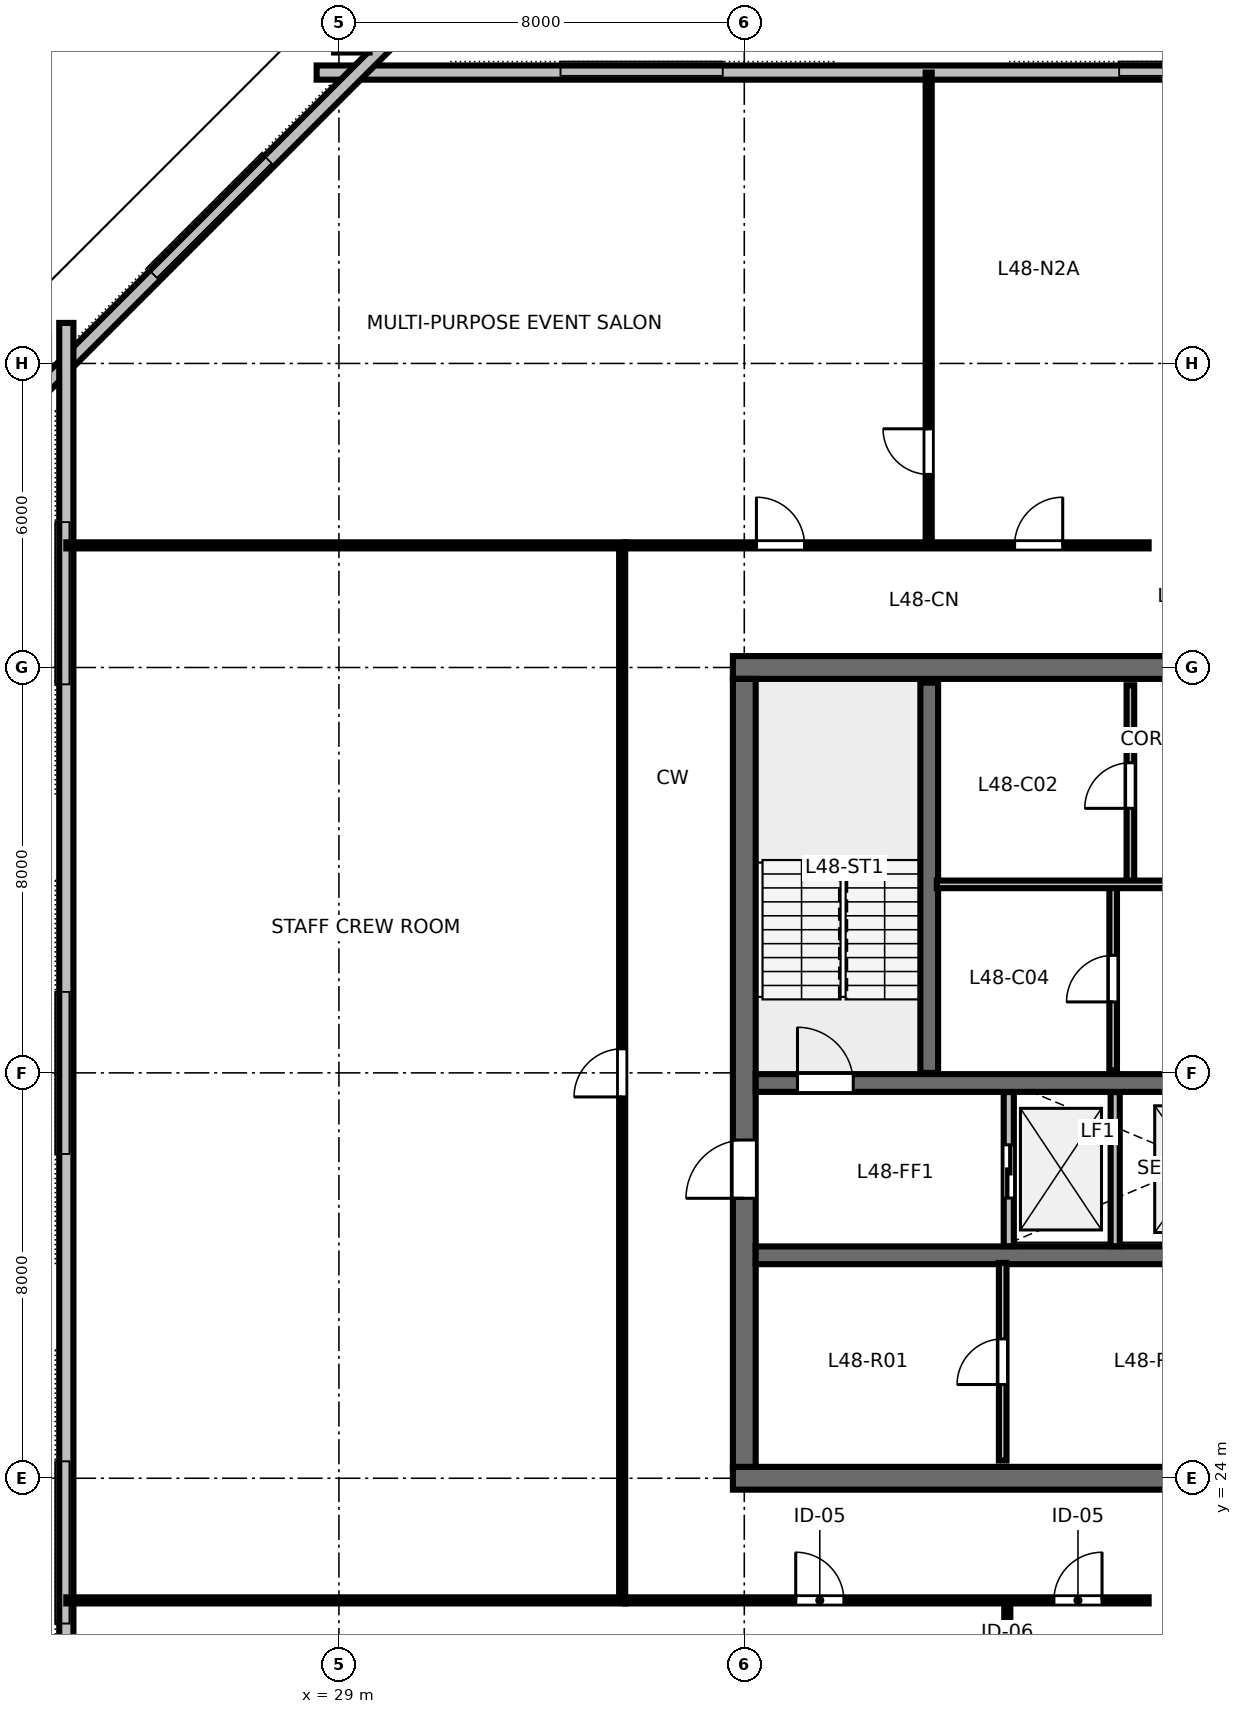
"""IFC4 building model, lengths in metres.
Left out: names, types, materials, properties, quantities, classifications, styles, units other than length and angle.
Written with IfcOpenShell. Run it as: python <this file> out.ifc"""

import sys

from ifc_helpers import new_model, si_unit, direction, frame, frame_2d, origin, origin_2d, place, context, subcontext, project, spatial, rectangle, hollow_rectangle, i_section, extrude, element, fill, save


model = new_model("IFC4")
c1 = context("Model", 3, precision=1e-05, world=origin(), true_north=direction((0.0, 1.0)))
c2 = subcontext(c1, "Body", "Model", "MODEL_VIEW")
j1 = project(units=[si_unit("LENGTHUNIT", "METRE"), si_unit("PLANEANGLEUNIT", "RADIAN")], contexts=[c1])
p1 = place(None, origin())
s1 = spatial("IfcSite", under=j1, at=p1, CompositionType="ELEMENT")
p2 = place(p1, origin())
s2 = spatial("IfcBuilding", under=s1, at=p2, CompositionType="ELEMENT")
p3 = place(p2, frame((0.0, 0.0, 184.2)))
s3 = spatial("IfcBuildingStorey", under=s2, at=p3, CompositionType="ELEMENT", Elevation=184.2)
p4 = place(p3, frame((36.775, 24.0, 0.0), z_axis=(0.0, 0.0, 1.0), x_axis=(1.0, 0.0, 0.0)))
e1 = element("IfcWall", 1, at=p4, inside=s3, PredefinedType="SHEAR", context=c2, shape_type="SweptSolid", body=[
    extrude(rectangle(XDim=18.45, YDim=0.45, at=frame_2d((9.225, 0.0))), origin(), (0.0, 0.0, 1.0), 3.36),
])
p5 = place(p4, frame((13.425, 0.0, 0.0)))
e2 = element("IfcOpeningElement", 2, at=p5, cuts=e1, PredefinedType="OPENING", context=c2, shape_type="SweptSolid", body=[
    extrude(rectangle(XDim=1.6, YDim=2.15, at=frame_2d((0.8, 1.075))), frame((0.0, 0.235, 0.0), z_axis=(0.0, -1.0, 0.0), x_axis=(1.0, 0.0, 0.0)), (0.0, 0.0, 1.0), 0.47),
])
p6 = place(p3, frame((36.775, 40.0, 0.0), z_axis=(0.0, 0.0, 1.0), x_axis=(1.0, 0.0, 0.0)))
e3 = element("IfcWall", 3, at=p6, inside=s3, PredefinedType="SHEAR", context=c2, shape_type="SweptSolid", body=[
    extrude(rectangle(XDim=18.45, YDim=0.45, at=frame_2d((9.225, 0.0))), origin(), (0.0, 0.0, 1.0), 3.36),
])
p7 = place(p6, frame((8.725, 0.0, 0.0)))
e4 = element("IfcOpeningElement", 4, at=p7, cuts=e3, PredefinedType="OPENING", context=c2, shape_type="SweptSolid", body=[
    extrude(rectangle(XDim=1.0, YDim=2.15, at=frame_2d((0.5, 1.075))), frame((0.0, 0.235, 0.0), z_axis=(0.0, -1.0, 0.0), x_axis=(1.0, 0.0, 0.0)), (0.0, 0.0, 1.0), 0.47),
])
p8 = place(p3, frame((37.0, 24.225, 0.0), z_axis=(0.0, 0.0, 1.0), x_axis=(0.0, 1.0, 0.0)))
e5 = element("IfcWall", 5, at=p8, inside=s3, PredefinedType="SHEAR", context=c2, shape_type="SweptSolid", body=[
    extrude(rectangle(XDim=15.55, YDim=0.45, at=frame_2d((7.775, 0.0))), origin(), (0.0, 0.0, 1.0), 3.36),
])
p9 = place(p8, frame((5.3, 0.0, 0.0)))
e6 = element("IfcOpeningElement", 6, at=p9, cuts=e5, PredefinedType="OPENING", context=c2, shape_type="SweptSolid", body=[
    extrude(rectangle(XDim=1.15, YDim=2.15, at=frame_2d((0.575, 1.075))), frame((0.0, 0.235, 0.0), z_axis=(0.0, -1.0, 0.0), x_axis=(1.0, 0.0, 0.0)), (0.0, 0.0, 1.0), 0.47),
])
p10 = place(p3, frame((37.225, 31.8, 0.0), z_axis=(0.0, 0.0, 1.0), x_axis=(1.0, 0.0, 0.0)))
e7 = element("IfcWall", 7, at=p10, inside=s3, PredefinedType="SHEAR", context=c2, shape_type="SweptSolid", body=[
    extrude(rectangle(XDim=17.55, YDim=0.35, at=frame_2d((8.775, 0.0))), origin(), (0.0, 0.0, 1.0), 3.36),
])
p11 = place(p10, frame((0.825, 0.0, 0.0)))
e8 = element("IfcOpeningElement", 8, at=p11, cuts=e7, PredefinedType="OPENING", context=c2, shape_type="SweptSolid", body=[
    extrude(rectangle(XDim=1.1, YDim=2.15, at=frame_2d((0.55, 1.075))), frame((0.0, 0.185, 0.0), z_axis=(0.0, -1.0, 0.0), x_axis=(1.0, 0.0, 0.0)), (0.0, 0.0, 1.0), 0.37),
])
p12 = place(p10, frame((14.725, 0.0, 0.0)))
e9 = element("IfcOpeningElement", 9, at=p12, cuts=e7, PredefinedType="OPENING", context=c2, shape_type="SweptSolid", body=[
    extrude(rectangle(XDim=1.1, YDim=2.15, at=frame_2d((0.55, 1.075))), frame((0.0, 0.185, 0.0), z_axis=(0.0, -1.0, 0.0), x_axis=(1.0, 0.0, 0.0)), (0.0, 0.0, 1.0), 0.37),
])
p13 = place(p3, frame((37.225, 28.4, 0.0), z_axis=(0.0, 0.0, 1.0), x_axis=(1.0, 0.0, 0.0)))
e10 = element("IfcWall", 10, at=p13, inside=s3, PredefinedType="SHEAR", context=c2, shape_type="SweptSolid", body=[
    extrude(rectangle(XDim=17.55, YDim=0.35, at=frame_2d((8.775, 0.0))), origin(), (0.0, 0.0, 1.0), 3.36),
])
p14 = place(p3, frame((29.255, 52.562, 0.0), z_axis=(0.252686968591, -0.187893668889, 0.949128687321), x_axis=(0.596699148139, 0.802465031394, 0.0)))
e11 = element("IfcColumn", 11, at=p14, inside=s3, PredefinedType="COLUMN", context=c2, shape_type="SweptSolid", body=[
    extrude(hollow_rectangle(XDim=0.7, YDim=0.85, WallThickness=0.04, at=origin_2d()), origin(), (0.0, 0.0, 1.0), 3.538),
])
p15 = place(p3, frame((22.854, 46.184, 0.0), z_axis=(0.221678120535, -0.219053075792, 0.950197116846), x_axis=(-0.67588069394, 0.66787712075, 0.311649545384)))
e12 = element("IfcColumn", 12, at=p15, inside=s3, PredefinedType="COLUMN", context=c2, shape_type="SweptSolid", body=[
    extrude(hollow_rectangle(XDim=0.7, YDim=0.85, WallThickness=0.04, at=origin_2d()), origin(), (0.0, 0.0, 1.0), 3.534),
])
p16 = place(p3, frame((22.96, 32.0, 0.0), z_axis=(0.226255694856, 0.0, 0.974067944522), x_axis=(-0.974067944522, 0.0, 0.226255694856)))
e13 = element("IfcColumn", 13, at=p16, inside=s3, PredefinedType="COLUMN", context=c2, shape_type="SweptSolid", body=[
    extrude(i_section(OverallWidth=0.406, OverallDepth=0.425, WebThickness=0.033, FlangeThickness=0.052, FilletRadius=0.025, at=origin_2d()), origin(), (0.0, 0.0, 1.0), 3.448),
])
p17 = place(p3, frame((63.44, 51.74, 0.0), z_axis=(0.0, 0.0, 1.0), x_axis=(-1.0, 0.0, 0.0)))
e14 = element("IfcWall", 14, at=p17, inside=s3, PredefinedType="STANDARD", context=c2, shape_type="SweptSolid", body=[
    extrude(rectangle(XDim=34.88, YDim=0.28, at=frame_2d((17.44, 0.0))), origin(), (0.0, 0.0, 1.0), 2.817),
])
p18 = place(p3, frame((29.946, 52.314, 0.0), z_axis=(0.0, 0.0, 1.0), x_axis=(-0.707106781187, -0.707106781187, 0.0)))
e15 = element("IfcWall", 15, at=p18, inside=s3, PredefinedType="STANDARD", context=c2, shape_type="SweptSolid", body=[
    extrude(rectangle(XDim=9.757, YDim=0.28, at=frame_2d((4.879, 0.0))), origin(), (0.0, 0.0, 1.0), 3.36),
])
p19 = place(p3, frame((23.62, 46.8, 0.0), z_axis=(0.0, 0.0, 1.0), x_axis=(0.0, -1.0, 0.0)))
e16 = element("IfcWall", 16, at=p19, inside=s3, PredefinedType="STANDARD", context=c2, shape_type="SweptSolid", body=[
    extrude(rectangle(XDim=29.6, YDim=0.28, at=frame_2d((14.8, 0.0))), origin(), (0.0, 0.0, 1.0), 2.817),
])
p20 = place(p3, frame((40.65, 32.0, 0.0), z_axis=(0.0, 0.0, 1.0), x_axis=(0.0, 1.0, 0.0)))
e17 = element("IfcWall", 17, at=p20, inside=s3, PredefinedType="SHEAR", context=c2, shape_type="SweptSolid", body=[
    extrude(rectangle(XDim=7.7, YDim=0.35, at=frame_2d((3.85, 0.0))), origin(), (0.0, 0.0, 1.0), 3.6),
])
p21 = place(p3, frame((44.62, 35.72, 0.0), z_axis=(0.0, 0.0, 1.0), x_axis=(0.0, 1.0, 0.0)))
e18 = element("IfcWall", 18, at=p21, inside=s3, PredefinedType="PARTITIONING", context=c2, shape_type="SweptSolid", body=[
    extrude(rectangle(XDim=3.93, YDim=0.15, at=frame_2d((1.965, 0.0))), origin(), (0.0, 0.0, 1.0), 3.36),
])
p22 = place(p21, frame((1.5, 0.0, 0.0)))
e19 = element("IfcOpeningElement", 19, at=p22, cuts=e18, PredefinedType="OPENING", context=c2, shape_type="SweptSolid", body=[
    extrude(rectangle(XDim=0.9, YDim=2.15, at=frame_2d((0.45, 1.075))), frame((0.0, 0.085, 0.0), z_axis=(0.0, -1.0, 0.0), x_axis=(1.0, 0.0, 0.0)), (0.0, 0.0, 1.0), 0.17),
])
p23 = place(p3, frame((44.28, 32.05, 0.0), z_axis=(0.0, 0.0, 1.0), x_axis=(0.0, 1.0, 0.0)))
e20 = element("IfcWall", 20, at=p23, inside=s3, PredefinedType="PARTITIONING", context=c2, shape_type="SweptSolid", body=[
    extrude(rectangle(XDim=3.67, YDim=0.15, at=frame_2d((1.835, 0.0))), origin(), (0.0, 0.0, 1.0), 3.36),
])
p24 = place(p23, frame((1.35, 0.0, 0.0)))
e21 = element("IfcOpeningElement", 21, at=p24, cuts=e20, PredefinedType="OPENING", context=c2, shape_type="SweptSolid", body=[
    extrude(rectangle(XDim=0.92, YDim=2.15, at=frame_2d((0.46, 1.075))), frame((0.0, 0.085, 0.0), z_axis=(0.0, -1.0, 0.0), x_axis=(1.0, 0.0, 0.0)), (0.0, 0.0, 1.0), 0.17),
])
p25 = place(p3, frame((40.8, 35.72, 0.0), z_axis=(0.0, 0.0, 1.0), x_axis=(1.0, 0.0, 0.0)))
e22 = element("IfcWall", 22, at=p25, inside=s3, PredefinedType="PARTITIONING", context=c2, shape_type="SweptSolid", body=[
    extrude(rectangle(XDim=10.4, YDim=0.15, at=frame_2d((5.2, 0.0))), origin(), (0.0, 0.0, 1.0), 3.36),
])
p26 = place(p25, frame((4.9, 0.0, 0.0)))
e23 = element("IfcOpeningElement", 23, at=p26, cuts=e22, PredefinedType="OPENING", context=c2, shape_type="SweptSolid", body=[
    extrude(rectangle(XDim=0.9, YDim=2.15, at=frame_2d((0.45, 1.075))), frame((0.0, 0.085, 0.0), z_axis=(0.0, -1.0, 0.0), x_axis=(1.0, 0.0, 0.0)), (0.0, 0.0, 1.0), 0.17),
])
p27 = place(p3, frame((42.22, 28.58, 0.0), z_axis=(0.0, 0.0, 1.0), x_axis=(0.0, 1.0, 0.0)))
e24 = element("IfcWall", 24, at=p27, inside=s3, PredefinedType="PARTITIONING", context=c2, shape_type="SweptSolid", body=[
    extrude(rectangle(XDim=3.04, YDim=0.2, at=frame_2d((1.52, 0.0))), origin(), (0.0, 0.0, 1.0), 3.36),
])
p28 = place(p27, frame((0.95, 0.0, 0.0)))
e25 = element("IfcOpeningElement", 25, at=p28, cuts=e24, PredefinedType="OPENING", context=c2, shape_type="SweptSolid", body=[
    extrude(rectangle(XDim=1.05, YDim=2.15, at=frame_2d((0.525, 1.075))), frame((0.0, 0.11, 0.0), z_axis=(0.0, -1.0, 0.0), x_axis=(1.0, 0.0, 0.0)), (0.0, 0.0, 1.0), 0.22),
])
p29 = place(p3, frame((44.32, 28.58, 0.0), z_axis=(0.0, 0.0, 1.0), x_axis=(0.0, 1.0, 0.0)))
e26 = element("IfcWall", 26, at=p29, inside=s3, PredefinedType="PARTITIONING", context=c2, shape_type="SweptSolid", body=[
    extrude(rectangle(XDim=3.04, YDim=0.18, at=frame_2d((1.52, 0.0))), origin(), (0.0, 0.0, 1.0), 3.36),
])
p30 = place(p3, frame((42.1, 24.35, 0.0), z_axis=(0.0, 0.0, 1.0), x_axis=(0.0, 1.0, 0.0)))
e27 = element("IfcWall", 27, at=p30, inside=s3, PredefinedType="PARTITIONING", context=c2, shape_type="SweptSolid", body=[
    extrude(rectangle(XDim=3.9, YDim=0.15, at=frame_2d((1.95, 0.0))), origin(), (0.0, 0.0, 1.0), 3.36),
])
p31 = place(p30, frame((1.5, 0.0, 0.0)))
e28 = element("IfcOpeningElement", 28, at=p31, cuts=e27, PredefinedType="OPENING", context=c2, shape_type="SweptSolid", body=[
    extrude(rectangle(XDim=0.9, YDim=2.15, at=frame_2d((0.45, 1.075))), frame((0.0, 0.085, 0.0), z_axis=(0.0, -1.0, 0.0), x_axis=(1.0, 0.0, 0.0)), (0.0, 0.0, 1.0), 0.17),
])
p32 = place(p3, frame((42.191, 21.59, 0.0), z_axis=(0.0, 0.0, 1.0), x_axis=(0.0, -1.0, 0.0)))
e29 = element("IfcWall", 29, at=p32, inside=s3, PredefinedType="PARTITIONING", context=c2, shape_type="SweptSolid", body=[
    extrude(rectangle(XDim=9.33, YDim=0.12, at=frame_2d((4.665, 0.0))), origin(), (0.0, 0.0, 1.0), 2.64),
])
p33 = place(p32, frame((1.4, 0.0, 0.0)))
e30 = element("IfcOpeningElement", 30, at=p33, cuts=e29, PredefinedType="OPENING", context=c2, shape_type="SweptSolid", body=[
    extrude(rectangle(XDim=0.9, YDim=2.15, at=frame_2d((0.45, 1.075))), frame((0.0, 0.07, 0.0), z_axis=(0.0, -1.0, 0.0), x_axis=(1.0, 0.0, 0.0)), (0.0, 0.0, 1.0), 0.14),
])
p34 = place(p3, frame((34.65, 21.59, 0.0), z_axis=(0.0, 0.0, 1.0), x_axis=(1.0, 0.0, 0.0)))
e31 = element("IfcWall", 31, at=p34, inside=s3, PredefinedType="PARTITIONING", context=c2, shape_type="SweptSolid", body=[
    extrude(rectangle(XDim=10.33, YDim=0.12, at=frame_2d((5.165, 0.0))), origin(), (0.0, 0.0, 1.0), 2.64),
])
p35 = place(p34, frame((3.365, 0.0, 0.0)))
e32 = element("IfcOpeningElement", 32, at=p35, cuts=e31, PredefinedType="OPENING", context=c2, shape_type="SweptSolid", body=[
    extrude(rectangle(XDim=0.95, YDim=2.15, at=frame_2d((0.475, 1.075))), frame((0.0, 0.07, 0.0), z_axis=(0.0, -1.0, 0.0), x_axis=(1.0, 0.0, 0.0)), (0.0, 0.0, 1.0), 0.14),
])
p36 = place(p34, frame((8.46, 0.0, 0.0)))
e33 = element("IfcOpeningElement", 33, at=p36, cuts=e31, PredefinedType="OPENING", context=c2, shape_type="SweptSolid", body=[
    extrude(rectangle(XDim=0.95, YDim=2.15, at=frame_2d((0.475, 1.075))), frame((0.0, 0.07, 0.0), z_axis=(0.0, -1.0, 0.0), x_axis=(1.0, 0.0, 0.0)), (0.0, 0.0, 1.0), 0.14),
])
p37 = place(p3, frame((40.639, 42.41, 0.0), z_axis=(0.0, 0.0, 1.0), x_axis=(0.0, 1.0, 0.0)))
e34 = element("IfcWall", 34, at=p37, inside=s3, PredefinedType="PARTITIONING", context=c2, shape_type="SweptSolid", body=[
    extrude(rectangle(XDim=9.33, YDim=0.12, at=frame_2d((4.665, 0.0))), origin(), (0.0, 0.0, 1.0), 2.64),
])
p38 = place(p37, frame((1.4, 0.0, 0.0)))
e35 = element("IfcOpeningElement", 35, at=p38, cuts=e34, PredefinedType="OPENING", context=c2, shape_type="SweptSolid", body=[
    extrude(rectangle(XDim=0.9, YDim=2.15, at=frame_2d((0.45, 1.075))), frame((0.0, 0.07, 0.0), z_axis=(0.0, -1.0, 0.0), x_axis=(1.0, 0.0, 0.0)), (0.0, 0.0, 1.0), 0.14),
])
p39 = place(p3, frame((34.65, 42.41, 0.0), z_axis=(0.0, 0.0, 1.0), x_axis=(1.0, 0.0, 0.0)))
e36 = element("IfcWall", 36, at=p39, inside=s3, PredefinedType="PARTITIONING", context=c2, shape_type="SweptSolid", body=[
    extrude(rectangle(XDim=10.33, YDim=0.12, at=frame_2d((5.165, 0.0))), origin(), (0.0, 0.0, 1.0), 2.64),
])
p40 = place(p39, frame((2.59, 0.0, 0.0)))
e37 = element("IfcOpeningElement", 37, at=p40, cuts=e36, PredefinedType="OPENING", context=c2, shape_type="SweptSolid", body=[
    extrude(rectangle(XDim=0.95, YDim=2.15, at=frame_2d((0.475, 1.075))), frame((0.0, 0.07, 0.0), z_axis=(0.0, -1.0, 0.0), x_axis=(1.0, 0.0, 0.0)), (0.0, 0.0, 1.0), 0.14),
])
p41 = place(p39, frame((7.685, 0.0, 0.0)))
e38 = element("IfcOpeningElement", 38, at=p41, cuts=e36, PredefinedType="OPENING", context=c2, shape_type="SweptSolid", body=[
    extrude(rectangle(XDim=0.95, YDim=2.15, at=frame_2d((0.475, 1.075))), frame((0.0, 0.07, 0.0), z_axis=(0.0, -1.0, 0.0), x_axis=(1.0, 0.0, 0.0)), (0.0, 0.0, 1.0), 0.14),
])
p42 = place(p3, frame((34.59, 21.65, 0.0), z_axis=(0.0, 0.0, 1.0), x_axis=(0.0, 1.0, 0.0)))
e39 = element("IfcWall", 39, at=p42, inside=s3, PredefinedType="PARTITIONING", context=c2, shape_type="SweptSolid", body=[
    extrude(rectangle(XDim=20.7, YDim=0.12, at=frame_2d((10.35, 0.0))), origin(), (0.0, 0.0, 1.0), 2.64),
])
p43 = place(p42, frame((9.875, 0.0, 0.0)))
e40 = element("IfcOpeningElement", 40, at=p43, cuts=e39, PredefinedType="OPENING", context=c2, shape_type="SweptSolid", body=[
    extrude(rectangle(XDim=0.95, YDim=2.15, at=frame_2d((0.475, 1.075))), frame((0.0, 0.07, 0.0), z_axis=(0.0, -1.0, 0.0), x_axis=(1.0, 0.0, 0.0)), (0.0, 0.0, 1.0), 0.14),
])
for number, where, z_axis, x_axis in (
    (41, (34.65, 21.59, 0.0), (0.0, 0.0, 1.0), (-1.0, 0.0, 0.0)),
    (42, (34.65, 42.41, 0.0), (0.0, 0.0, 1.0), (-1.0, 0.0, 0.0)),
):
    element("IfcWall", number, at=place(p3, frame(where, z_axis=z_axis, x_axis=x_axis)), inside=s3, PredefinedType="PARTITIONING", context=c2, shape_type="SweptSolid", body=[
        extrude(rectangle(XDim=11.03, YDim=0.12, at=frame_2d((5.515, 0.0))), origin(), (0.0, 0.0, 1.0), 2.64),
    ])
p44 = place(p11, origin())
e43 = element("IfcDoor", 43, at=p44, inside=s3, OperationType="SINGLE_SWING_LEFT", PredefinedType="DOOR", context=c2, shape_type="SweptSolid", body=[
    extrude(rectangle(XDim=1.1, YDim=2.15, at=frame_2d((0.55, 1.075))), frame((0.0, 0.025, 0.0), z_axis=(0.0, -1.0, 0.0), x_axis=(1.0, 0.0, 0.0)), (0.0, 0.0, 1.0), 0.05),
])
fill(e8, e43)
p45 = place(p9, origin())
e44 = element("IfcDoor", 44, at=p45, inside=s3, OperationType="SINGLE_SWING_LEFT", PredefinedType="DOOR", context=c2, shape_type="SweptSolid", body=[
    extrude(rectangle(XDim=1.15, YDim=2.15, at=frame_2d((0.575, 1.075))), frame((0.0, 0.025, 0.0), z_axis=(0.0, -1.0, 0.0), x_axis=(1.0, 0.0, 0.0)), (0.0, 0.0, 1.0), 0.05),
])
fill(e6, e44)
p46 = place(p22, origin())
e45 = element("IfcDoor", 45, at=p46, inside=s3, OperationType="SINGLE_SWING_LEFT", PredefinedType="DOOR", context=c2, shape_type="SweptSolid", body=[
    extrude(rectangle(XDim=0.9, YDim=2.15, at=frame_2d((0.45, 1.075))), frame((0.0, 0.025, 0.0), z_axis=(0.0, -1.0, 0.0), x_axis=(1.0, 0.0, 0.0)), (0.0, 0.0, 1.0), 0.05),
])
fill(e19, e45)
p47 = place(p24, origin())
e46 = element("IfcDoor", 46, at=p47, inside=s3, OperationType="SINGLE_SWING_LEFT", PredefinedType="DOOR", context=c2, shape_type="SweptSolid", body=[
    extrude(rectangle(XDim=0.92, YDim=2.15, at=frame_2d((0.46, 1.075))), frame((0.0, 0.025, 0.0), z_axis=(0.0, -1.0, 0.0), x_axis=(1.0, 0.0, 0.0)), (0.0, 0.0, 1.0), 0.05),
])
fill(e21, e46)
p48 = place(p28, origin())
e47 = element("IfcDoor", 47, at=p48, inside=s3, OperationType="SLIDING_TO_LEFT", PredefinedType="DOOR", context=c2, shape_type="SweptSolid", body=[
    extrude(rectangle(XDim=1.05, YDim=2.15, at=frame_2d((0.525, 1.075))), frame((0.0, 0.025, 0.0), z_axis=(0.0, -1.0, 0.0), x_axis=(1.0, 0.0, 0.0)), (0.0, 0.0, 1.0), 0.05),
])
fill(e25, e47)
p49 = place(p31, origin())
e48 = element("IfcDoor", 48, at=p49, inside=s3, OperationType="SINGLE_SWING_LEFT", PredefinedType="DOOR", context=c2, shape_type="SweptSolid", body=[
    extrude(rectangle(XDim=0.9, YDim=2.15, at=frame_2d((0.45, 1.075))), frame((0.0, 0.025, 0.0), z_axis=(0.0, -1.0, 0.0), x_axis=(1.0, 0.0, 0.0)), (0.0, 0.0, 1.0), 0.05),
])
fill(e28, e48)
p50 = place(p35, origin())
e49 = element("IfcDoor", 49, at=p50, inside=s3, OperationType="SINGLE_SWING_LEFT", PredefinedType="DOOR", context=c2, shape_type="SweptSolid", body=[
    extrude(rectangle(XDim=0.95, YDim=2.15, at=frame_2d((0.475, 1.075))), frame((0.0, 0.025, 0.0), z_axis=(0.0, -1.0, 0.0), x_axis=(1.0, 0.0, 0.0)), (0.0, 0.0, 1.0), 0.05),
])
fill(e32, e49)
p51 = place(p36, origin())
e50 = element("IfcDoor", 50, at=p51, inside=s3, OperationType="SINGLE_SWING_RIGHT", PredefinedType="DOOR", context=c2, shape_type="SweptSolid", body=[
    extrude(rectangle(XDim=0.95, YDim=2.15, at=frame_2d((0.475, 1.075))), frame((0.0, 0.025, 0.0), z_axis=(0.0, -1.0, 0.0), x_axis=(1.0, 0.0, 0.0)), (0.0, 0.0, 1.0), 0.05),
])
fill(e33, e50)
p52 = place(p38, origin())
e51 = element("IfcDoor", 51, at=p52, inside=s3, OperationType="SINGLE_SWING_RIGHT", PredefinedType="DOOR", context=c2, shape_type="SweptSolid", body=[
    extrude(rectangle(XDim=0.9, YDim=2.15, at=frame_2d((0.45, 1.075))), frame((0.0, 0.025, 0.0), z_axis=(0.0, -1.0, 0.0), x_axis=(1.0, 0.0, 0.0)), (0.0, 0.0, 1.0), 0.05),
])
fill(e35, e51)
p53 = place(p40, origin())
e52 = element("IfcDoor", 52, at=p53, inside=s3, OperationType="SINGLE_SWING_LEFT", PredefinedType="DOOR", context=c2, shape_type="SweptSolid", body=[
    extrude(rectangle(XDim=0.95, YDim=2.15, at=frame_2d((0.475, 1.075))), frame((0.0, 0.025, 0.0), z_axis=(0.0, -1.0, 0.0), x_axis=(1.0, 0.0, 0.0)), (0.0, 0.0, 1.0), 0.05),
])
fill(e37, e52)
p54 = place(p41, origin())
e53 = element("IfcDoor", 53, at=p54, inside=s3, OperationType="SINGLE_SWING_RIGHT", PredefinedType="DOOR", context=c2, shape_type="SweptSolid", body=[
    extrude(rectangle(XDim=0.95, YDim=2.15, at=frame_2d((0.475, 1.075))), frame((0.0, 0.025, 0.0), z_axis=(0.0, -1.0, 0.0), x_axis=(1.0, 0.0, 0.0)), (0.0, 0.0, 1.0), 0.05),
])
fill(e38, e53)
p55 = place(p43, origin())
e54 = element("IfcDoor", 54, at=p55, inside=s3, OperationType="SINGLE_SWING_LEFT", PredefinedType="DOOR", context=c2, shape_type="SweptSolid", body=[
    extrude(rectangle(XDim=0.95, YDim=2.15, at=frame_2d((0.475, 1.075))), frame((0.0, 0.025, 0.0), z_axis=(0.0, -1.0, 0.0), x_axis=(1.0, 0.0, 0.0)), (0.0, 0.0, 1.0), 0.05),
])
fill(e40, e54)
save(model, sys.argv[1])
